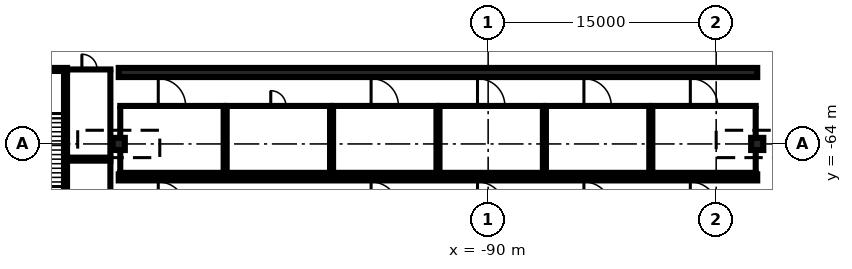
"""IFC4 building model, lengths in metres.
Left out: names, types, materials, properties, quantities, classifications, styles, units other than length and angle.
Written with IfcOpenShell. Run it as: python <this file> out.ifc"""

import sys

from ifc_helpers import new_model, si_unit, direction, frame, frame_2d, origin, origin_2d, place, context, subcontext, project, spatial, rectangle, extrude, element, fill, save


model = new_model("IFC4")
c1 = context("Model", 3, precision=1e-05, world=origin(), true_north=direction((0.0, 1.0)))
c2 = subcontext(c1, "Body", "Model", "MODEL_VIEW")
j1 = project(units=[si_unit("LENGTHUNIT", "METRE"), si_unit("PLANEANGLEUNIT", "RADIAN")], contexts=[c1])
p1 = place(None, origin())
s1 = spatial("IfcSite", under=j1, at=p1, CompositionType="ELEMENT")
p2 = place(p1, origin())
s2 = spatial("IfcBuilding", under=s1, at=p2, CompositionType="ELEMENT")
p3 = place(p2, frame((0.0, 0.0, -12.0)))
s3 = spatial("IfcBuildingStorey", under=s2, at=p3, CompositionType="ELEMENT", Elevation=-12.0)
for number, where, z_axis, x_axis in (
    (1, (-114.3, -64.0, 0.0), (0.0, 0.0, 1.0), (1.0, 0.0, 0.0)),
    (2, (-72.3, -64.0, 0.0), (0.0, 0.0, 1.0), (1.0, 0.0, 0.0)),
):
    element("IfcColumn", number, at=place(p3, frame(where, z_axis=z_axis, x_axis=x_axis)), inside=s3, PredefinedType="COLUMN", context=c2, shape_type="SweptSolid", body=[
        extrude(rectangle(XDim=0.8, YDim=0.8, at=origin_2d()), origin(), (0.0, 0.0, 1.0), 4.4),
    ])
p4 = place(p3, frame((-114.3, -65.9, 0.0), z_axis=(0.0, 0.0, 1.0), x_axis=(1.0, 0.0, 0.0)))
e3 = element("IfcWall", 3, at=p4, inside=s3, PredefinedType="PARTITIONING", context=c2, shape_type="SweptSolid", body=[
    extrude(rectangle(XDim=7.0, YDim=0.2, at=frame_2d((3.5, 0.0))), origin(), (0.0, 0.0, 1.0), 4.4),
])
p5 = place(p3, frame((-114.3, -61.5, 0.0), z_axis=(0.0, 0.0, 1.0), x_axis=(1.0, 0.0, 0.0)))
e4 = element("IfcWall", 4, at=p5, inside=s3, PredefinedType="PARTITIONING", context=c2, shape_type="SweptSolid", body=[
    extrude(rectangle(XDim=7.0, YDim=0.2, at=frame_2d((3.5, 0.0))), origin(), (0.0, 0.0, 1.0), 4.4),
])
p6 = place(p5, frame((2.6, 0.0, 0.0)))
e5 = element("IfcOpeningElement", 5, at=p6, cuts=e4, PredefinedType="OPENING", context=c2, shape_type="SweptSolid", body=[
    extrude(rectangle(XDim=1.8, YDim=2.1, at=frame_2d((0.9, 1.05))), frame((0.0, 0.11, 0.0), z_axis=(0.0, -1.0, 0.0), x_axis=(1.0, 0.0, 0.0)), (0.0, 0.0, 1.0), 0.22),
])
p7 = place(p3, frame((-114.2, -65.8, 0.0), z_axis=(0.0, 0.0, 1.0), x_axis=(0.0, 1.0, 0.0)))
e6 = element("IfcWall", 6, at=p7, inside=s3, PredefinedType="PARTITIONING", context=c2, shape_type="SweptSolid", body=[
    extrude(rectangle(XDim=1.4, YDim=0.2, at=frame_2d((0.7, 0.0))), origin(), (0.0, 0.0, 1.0), 4.4),
])
p8 = place(p3, frame((-114.2, -63.6, 0.0), z_axis=(0.0, 0.0, 1.0), x_axis=(0.0, 1.0, 0.0)))
e7 = element("IfcWall", 7, at=p8, inside=s3, PredefinedType="PARTITIONING", context=c2, shape_type="SweptSolid", body=[
    extrude(rectangle(XDim=2.0, YDim=0.2, at=frame_2d((1.0, 0.0))), origin(), (0.0, 0.0, 1.0), 4.4),
])
p9 = place(p3, frame((-107.4, -65.8, 0.0), z_axis=(0.0, 0.0, 1.0), x_axis=(0.0, 1.0, 0.0)))
e8 = element("IfcWall", 8, at=p9, inside=s3, PredefinedType="PARTITIONING", context=c2, shape_type="SweptSolid", body=[
    extrude(rectangle(XDim=4.2, YDim=0.2, at=frame_2d((2.1, 0.0))), origin(), (0.0, 0.0, 1.0), 4.4),
])
p10 = place(p3, frame((-107.3, -65.9, 0.0), z_axis=(0.0, 0.0, 1.0), x_axis=(1.0, 0.0, 0.0)))
e9 = element("IfcWall", 9, at=p10, inside=s3, PredefinedType="PARTITIONING", context=c2, shape_type="SweptSolid", body=[
    extrude(rectangle(XDim=7.0, YDim=0.2, at=frame_2d((3.5, 0.0))), origin(), (0.0, 0.0, 1.0), 4.4),
])
p11 = place(p3, frame((-107.3, -61.5, 0.0), z_axis=(0.0, 0.0, 1.0), x_axis=(1.0, 0.0, 0.0)))
e10 = element("IfcWall", 10, at=p11, inside=s3, PredefinedType="PARTITIONING", context=c2, shape_type="SweptSolid", body=[
    extrude(rectangle(XDim=7.0, YDim=0.2, at=frame_2d((3.5, 0.0))), origin(), (0.0, 0.0, 1.0), 4.4),
])
p12 = place(p11, frame((3.0, 0.0, 0.0)))
e11 = element("IfcOpeningElement", 11, at=p12, cuts=e10, PredefinedType="OPENING", context=c2, shape_type="SweptSolid", body=[
    extrude(rectangle(XDim=1.0, YDim=2.1, at=frame_2d((0.5, 1.05))), frame((0.0, 0.11, 0.0), z_axis=(0.0, -1.0, 0.0), x_axis=(1.0, 0.0, 0.0)), (0.0, 0.0, 1.0), 0.22),
])
for number, where, z_axis, x_axis in (
    (12, (-107.2, -65.8, 0.0), (0.0, 0.0, 1.0), (0.0, 1.0, 0.0)),
    (13, (-100.4, -65.8, 0.0), (0.0, 0.0, 1.0), (0.0, 1.0, 0.0)),
):
    element("IfcWall", number, at=place(p3, frame(where, z_axis=z_axis, x_axis=x_axis)), inside=s3, PredefinedType="PARTITIONING", context=c2, shape_type="SweptSolid", body=[
        extrude(rectangle(XDim=4.2, YDim=0.2, at=frame_2d((2.1, 0.0))), origin(), (0.0, 0.0, 1.0), 4.4),
    ])
p13 = place(p3, frame((-100.3, -65.9, 0.0), z_axis=(0.0, 0.0, 1.0), x_axis=(1.0, 0.0, 0.0)))
e14 = element("IfcWall", 14, at=p13, inside=s3, PredefinedType="PARTITIONING", context=c2, shape_type="SweptSolid", body=[
    extrude(rectangle(XDim=7.0, YDim=0.2, at=frame_2d((3.5, 0.0))), origin(), (0.0, 0.0, 1.0), 4.4),
])
p14 = place(p3, frame((-100.3, -61.5, 0.0), z_axis=(0.0, 0.0, 1.0), x_axis=(1.0, 0.0, 0.0)))
e15 = element("IfcWall", 15, at=p14, inside=s3, PredefinedType="PARTITIONING", context=c2, shape_type="SweptSolid", body=[
    extrude(rectangle(XDim=7.0, YDim=0.2, at=frame_2d((3.5, 0.0))), origin(), (0.0, 0.0, 1.0), 4.4),
])
p15 = place(p14, frame((2.6, 0.0, 0.0)))
e16 = element("IfcOpeningElement", 16, at=p15, cuts=e15, PredefinedType="OPENING", context=c2, shape_type="SweptSolid", body=[
    extrude(rectangle(XDim=1.8, YDim=2.1, at=frame_2d((0.9, 1.05))), frame((0.0, 0.11, 0.0), z_axis=(0.0, -1.0, 0.0), x_axis=(1.0, 0.0, 0.0)), (0.0, 0.0, 1.0), 0.22),
])
for number, where, z_axis, x_axis in (
    (17, (-100.2, -65.8, 0.0), (0.0, 0.0, 1.0), (0.0, 1.0, 0.0)),
    (18, (-93.4, -65.8, 0.0), (0.0, 0.0, 1.0), (0.0, 1.0, 0.0)),
):
    element("IfcWall", number, at=place(p3, frame(where, z_axis=z_axis, x_axis=x_axis)), inside=s3, PredefinedType="PARTITIONING", context=c2, shape_type="SweptSolid", body=[
        extrude(rectangle(XDim=4.2, YDim=0.2, at=frame_2d((2.1, 0.0))), origin(), (0.0, 0.0, 1.0), 4.4),
    ])
p16 = place(p3, frame((-93.3, -65.9, 0.0), z_axis=(0.0, 0.0, 1.0), x_axis=(1.0, 0.0, 0.0)))
e19 = element("IfcWall", 19, at=p16, inside=s3, PredefinedType="PARTITIONING", context=c2, shape_type="SweptSolid", body=[
    extrude(rectangle(XDim=7.0, YDim=0.2, at=frame_2d((3.5, 0.0))), origin(), (0.0, 0.0, 1.0), 4.4),
])
p17 = place(p3, frame((-93.3, -61.5, 0.0), z_axis=(0.0, 0.0, 1.0), x_axis=(1.0, 0.0, 0.0)))
e20 = element("IfcWall", 20, at=p17, inside=s3, PredefinedType="PARTITIONING", context=c2, shape_type="SweptSolid", body=[
    extrude(rectangle(XDim=7.0, YDim=0.2, at=frame_2d((3.5, 0.0))), origin(), (0.0, 0.0, 1.0), 4.4),
])
p18 = place(p17, frame((2.6, 0.0, 0.0)))
e21 = element("IfcOpeningElement", 21, at=p18, cuts=e20, PredefinedType="OPENING", context=c2, shape_type="SweptSolid", body=[
    extrude(rectangle(XDim=1.8, YDim=2.1, at=frame_2d((0.9, 1.05))), frame((0.0, 0.11, 0.0), z_axis=(0.0, -1.0, 0.0), x_axis=(1.0, 0.0, 0.0)), (0.0, 0.0, 1.0), 0.22),
])
for number, where, z_axis, x_axis in (
    (22, (-93.2, -65.8, 0.0), (0.0, 0.0, 1.0), (0.0, 1.0, 0.0)),
    (23, (-86.4, -65.8, 0.0), (0.0, 0.0, 1.0), (0.0, 1.0, 0.0)),
):
    element("IfcWall", number, at=place(p3, frame(where, z_axis=z_axis, x_axis=x_axis)), inside=s3, PredefinedType="PARTITIONING", context=c2, shape_type="SweptSolid", body=[
        extrude(rectangle(XDim=4.2, YDim=0.2, at=frame_2d((2.1, 0.0))), origin(), (0.0, 0.0, 1.0), 4.4),
    ])
p19 = place(p3, frame((-86.3, -65.9, 0.0), z_axis=(0.0, 0.0, 1.0), x_axis=(1.0, 0.0, 0.0)))
e24 = element("IfcWall", 24, at=p19, inside=s3, PredefinedType="PARTITIONING", context=c2, shape_type="SweptSolid", body=[
    extrude(rectangle(XDim=7.0, YDim=0.2, at=frame_2d((3.5, 0.0))), origin(), (0.0, 0.0, 1.0), 4.4),
])
p20 = place(p3, frame((-86.3, -61.5, 0.0), z_axis=(0.0, 0.0, 1.0), x_axis=(1.0, 0.0, 0.0)))
e25 = element("IfcWall", 25, at=p20, inside=s3, PredefinedType="PARTITIONING", context=c2, shape_type="SweptSolid", body=[
    extrude(rectangle(XDim=7.0, YDim=0.2, at=frame_2d((3.5, 0.0))), origin(), (0.0, 0.0, 1.0), 4.4),
])
p21 = place(p20, frame((2.6, 0.0, 0.0)))
e26 = element("IfcOpeningElement", 26, at=p21, cuts=e25, PredefinedType="OPENING", context=c2, shape_type="SweptSolid", body=[
    extrude(rectangle(XDim=1.8, YDim=2.1, at=frame_2d((0.9, 1.05))), frame((0.0, 0.11, 0.0), z_axis=(0.0, -1.0, 0.0), x_axis=(1.0, 0.0, 0.0)), (0.0, 0.0, 1.0), 0.22),
])
for number, where, z_axis, x_axis in (
    (27, (-86.2, -65.8, 0.0), (0.0, 0.0, 1.0), (0.0, 1.0, 0.0)),
    (28, (-79.4, -65.8, 0.0), (0.0, 0.0, 1.0), (0.0, 1.0, 0.0)),
):
    element("IfcWall", number, at=place(p3, frame(where, z_axis=z_axis, x_axis=x_axis)), inside=s3, PredefinedType="PARTITIONING", context=c2, shape_type="SweptSolid", body=[
        extrude(rectangle(XDim=4.2, YDim=0.2, at=frame_2d((2.1, 0.0))), origin(), (0.0, 0.0, 1.0), 4.4),
    ])
p22 = place(p3, frame((-79.3, -65.9, 0.0), z_axis=(0.0, 0.0, 1.0), x_axis=(1.0, 0.0, 0.0)))
e29 = element("IfcWall", 29, at=p22, inside=s3, PredefinedType="PARTITIONING", context=c2, shape_type="SweptSolid", body=[
    extrude(rectangle(XDim=7.0, YDim=0.2, at=frame_2d((3.5, 0.0))), origin(), (0.0, 0.0, 1.0), 4.4),
])
p23 = place(p3, frame((-79.3, -61.5, 0.0), z_axis=(0.0, 0.0, 1.0), x_axis=(1.0, 0.0, 0.0)))
e30 = element("IfcWall", 30, at=p23, inside=s3, PredefinedType="PARTITIONING", context=c2, shape_type="SweptSolid", body=[
    extrude(rectangle(XDim=7.0, YDim=0.2, at=frame_2d((3.5, 0.0))), origin(), (0.0, 0.0, 1.0), 4.4),
])
p24 = place(p23, frame((2.6, 0.0, 0.0)))
e31 = element("IfcOpeningElement", 31, at=p24, cuts=e30, PredefinedType="OPENING", context=c2, shape_type="SweptSolid", body=[
    extrude(rectangle(XDim=1.8, YDim=2.1, at=frame_2d((0.9, 1.05))), frame((0.0, 0.11, 0.0), z_axis=(0.0, -1.0, 0.0), x_axis=(1.0, 0.0, 0.0)), (0.0, 0.0, 1.0), 0.22),
])
p25 = place(p3, frame((-79.2, -65.8, 0.0), z_axis=(0.0, 0.0, 1.0), x_axis=(0.0, 1.0, 0.0)))
e32 = element("IfcWall", 32, at=p25, inside=s3, PredefinedType="PARTITIONING", context=c2, shape_type="SweptSolid", body=[
    extrude(rectangle(XDim=4.2, YDim=0.2, at=frame_2d((2.1, 0.0))), origin(), (0.0, 0.0, 1.0), 4.4),
])
p26 = place(p3, frame((-72.4, -65.8, 0.0), z_axis=(0.0, 0.0, 1.0), x_axis=(0.0, 1.0, 0.0)))
e33 = element("IfcWall", 33, at=p26, inside=s3, PredefinedType="PARTITIONING", context=c2, shape_type="SweptSolid", body=[
    extrude(rectangle(XDim=1.4, YDim=0.2, at=frame_2d((0.7, 0.0))), origin(), (0.0, 0.0, 1.0), 4.4),
])
p27 = place(p3, frame((-72.4, -63.6, 0.0), z_axis=(0.0, 0.0, 1.0), x_axis=(0.0, 1.0, 0.0)))
e34 = element("IfcWall", 34, at=p27, inside=s3, PredefinedType="PARTITIONING", context=c2, shape_type="SweptSolid", body=[
    extrude(rectangle(XDim=2.0, YDim=0.2, at=frame_2d((1.0, 0.0))), origin(), (0.0, 0.0, 1.0), 4.4),
])
p28 = place(p3, frame((-117.7, -65.1, 0.0), z_axis=(0.0, 0.0, 1.0), x_axis=(1.0, 0.0, 0.0)))
e35 = element("IfcWall", 35, at=p28, inside=s3, PredefinedType="PARTITIONING", context=c2, shape_type="SweptSolid", body=[
    extrude(rectangle(XDim=2.95, YDim=0.2, at=frame_2d((1.475, 0.0))), origin(), (0.0, 0.0, 1.0), 4.4),
])
p29 = place(p3, frame((-114.85, -68.8, 0.0), z_axis=(0.0, 0.0, 1.0), x_axis=(0.0, 1.0, 0.0)))
e36 = element("IfcWall", 36, at=p29, inside=s3, PredefinedType="PARTITIONING", context=c2, shape_type="SweptSolid", body=[
    extrude(rectangle(XDim=3.6, YDim=0.2, at=frame_2d((1.8, 0.0))), origin(), (0.0, 0.0, 1.0), 4.4),
])
p30 = place(p3, frame((-117.7, -64.9, 0.0), z_axis=(0.0, 0.0, 1.0), x_axis=(1.0, 0.0, 0.0)))
e37 = element("IfcWall", 37, at=p30, inside=s3, PredefinedType="PARTITIONING", context=c2, shape_type="SweptSolid", body=[
    extrude(rectangle(XDim=2.95, YDim=0.2, at=frame_2d((1.475, 0.0))), origin(), (0.0, 0.0, 1.0), 4.4),
])
p31 = place(p3, frame((-117.7, -59.1, 0.0), z_axis=(0.0, 0.0, 1.0), x_axis=(1.0, 0.0, 0.0)))
e38 = element("IfcWall", 38, at=p31, inside=s3, PredefinedType="PARTITIONING", context=c2, shape_type="SweptSolid", body=[
    extrude(rectangle(XDim=2.95, YDim=0.2, at=frame_2d((1.475, 0.0))), origin(), (0.0, 0.0, 1.0), 4.4),
])
p32 = place(p31, frame((0.975, 0.0, 0.0)))
e39 = element("IfcOpeningElement", 39, at=p32, cuts=e38, PredefinedType="OPENING", context=c2, shape_type="SweptSolid", body=[
    extrude(rectangle(XDim=1.0, YDim=2.1, at=frame_2d((0.5, 1.05))), frame((0.0, 0.11, 0.0), z_axis=(0.0, -1.0, 0.0), x_axis=(1.0, 0.0, 0.0)), (0.0, 0.0, 1.0), 0.22),
])
p33 = place(p3, frame((-114.85, -64.8, 0.0), z_axis=(0.0, 0.0, 1.0), x_axis=(0.0, 1.0, 0.0)))
e40 = element("IfcWall", 40, at=p33, inside=s3, PredefinedType="PARTITIONING", context=c2, shape_type="SweptSolid", body=[
    extrude(rectangle(XDim=5.6, YDim=0.2, at=frame_2d((2.8, 0.0))), origin(), (0.0, 0.0, 1.0), 4.4),
])
p34 = place(p3, frame((-117.8, -68.8, 0.0), z_axis=(0.0, 0.0, 1.0), x_axis=(0.0, 1.0, 0.0)))
e41 = element("IfcWall", 41, at=p34, inside=s3, PredefinedType="SOLIDWALL", context=c2, shape_type="SweptSolid", body=[
    extrude(rectangle(XDim=9.6, YDim=0.2, at=frame_2d((4.8, 0.0))), origin(), (0.0, 0.0, 1.0), 4.4),
])
p35 = place(p34, frame((0.4, 0.0, 0.0)))
e42 = element("IfcOpeningElement", 42, at=p35, cuts=e41, PredefinedType="OPENING", context=c2, shape_type="SweptSolid", body=[
    extrude(rectangle(XDim=1.2, YDim=2.1, at=frame_2d((0.6, 1.05))), frame((0.0, 0.11, 0.0), z_axis=(0.0, -1.0, 0.0), x_axis=(1.0, 0.0, 0.0)), (0.0, 0.0, 1.0), 0.22),
])
p36 = place(p3, frame((-122.7, -59.1, 0.0), z_axis=(0.0, 0.0, 1.0), x_axis=(1.0, 0.0, 0.0)))
e43 = element("IfcWall", 43, at=p36, inside=s3, PredefinedType="SOLIDWALL", context=c2, shape_type="SweptSolid", body=[
    extrude(rectangle(XDim=5.0, YDim=0.2, at=frame_2d((2.5, 0.0))), origin(), (0.0, 0.0, 1.0), 4.4),
])
p37 = place(p3, frame((-114.3, -66.2, 0.0), z_axis=(0.0, 0.0, 1.0), x_axis=(1.0, 0.0, 0.0)))
e44 = element("IfcWall", 44, at=p37, inside=s3, PredefinedType="SOLIDWALL", context=c2, shape_type="SweptSolid", body=[
    extrude(rectangle(XDim=42.0, YDim=0.4, at=frame_2d((21.0, 0.0))), origin(), (0.0, 0.0, 1.0), 4.4),
])
p38 = place(p3, frame((-114.3, -59.3, 0.0), z_axis=(0.0, 0.0, 1.0), x_axis=(1.0, 0.0, 0.0)))
e45 = element("IfcWall", 45, at=p38, inside=s3, PredefinedType="SOLIDWALL", context=c2, shape_type="SweptSolid", body=[
    extrude(rectangle(XDim=42.0, YDim=0.6, at=frame_2d((21.0, 0.0))), origin(), (0.0, 0.0, 1.0), 4.4),
])
p39 = place(p6, origin())
e46 = element("IfcDoor", 46, at=p39, inside=s3, OperationType="DOUBLE_DOOR_SINGLE_SWING", PredefinedType="DOOR", context=c2, shape_type="SweptSolid", body=[
    extrude(rectangle(XDim=1.8, YDim=2.1, at=frame_2d((0.9, 1.05))), frame((0.0, 0.025, 0.0), z_axis=(0.0, -1.0, 0.0), x_axis=(1.0, 0.0, 0.0)), (0.0, 0.0, 1.0), 0.05),
])
fill(e5, e46)
p40 = place(p12, origin())
e47 = element("IfcDoor", 47, at=p40, inside=s3, OperationType="SINGLE_SWING_LEFT", PredefinedType="DOOR", context=c2, shape_type="SweptSolid", body=[
    extrude(rectangle(XDim=1.0, YDim=2.1, at=frame_2d((0.5, 1.05))), frame((0.0, 0.025, 0.0), z_axis=(0.0, -1.0, 0.0), x_axis=(1.0, 0.0, 0.0)), (0.0, 0.0, 1.0), 0.05),
])
fill(e11, e47)
p41 = place(p15, origin())
e48 = element("IfcDoor", 48, at=p41, inside=s3, OperationType="DOUBLE_DOOR_SINGLE_SWING", PredefinedType="DOOR", context=c2, shape_type="SweptSolid", body=[
    extrude(rectangle(XDim=1.8, YDim=2.1, at=frame_2d((0.9, 1.05))), frame((0.0, 0.025, 0.0), z_axis=(0.0, -1.0, 0.0), x_axis=(1.0, 0.0, 0.0)), (0.0, 0.0, 1.0), 0.05),
])
fill(e16, e48)
p42 = place(p18, origin())
e49 = element("IfcDoor", 49, at=p42, inside=s3, OperationType="DOUBLE_DOOR_SINGLE_SWING", PredefinedType="DOOR", context=c2, shape_type="SweptSolid", body=[
    extrude(rectangle(XDim=1.8, YDim=2.1, at=frame_2d((0.9, 1.05))), frame((0.0, 0.025, 0.0), z_axis=(0.0, -1.0, 0.0), x_axis=(1.0, 0.0, 0.0)), (0.0, 0.0, 1.0), 0.05),
])
fill(e21, e49)
p43 = place(p21, origin())
e50 = element("IfcDoor", 50, at=p43, inside=s3, OperationType="DOUBLE_DOOR_SINGLE_SWING", PredefinedType="DOOR", context=c2, shape_type="SweptSolid", body=[
    extrude(rectangle(XDim=1.8, YDim=2.1, at=frame_2d((0.9, 1.05))), frame((0.0, 0.025, 0.0), z_axis=(0.0, -1.0, 0.0), x_axis=(1.0, 0.0, 0.0)), (0.0, 0.0, 1.0), 0.05),
])
fill(e26, e50)
p44 = place(p24, origin())
e51 = element("IfcDoor", 51, at=p44, inside=s3, OperationType="DOUBLE_DOOR_SINGLE_SWING", PredefinedType="DOOR", context=c2, shape_type="SweptSolid", body=[
    extrude(rectangle(XDim=1.8, YDim=2.1, at=frame_2d((0.9, 1.05))), frame((0.0, 0.025, 0.0), z_axis=(0.0, -1.0, 0.0), x_axis=(1.0, 0.0, 0.0)), (0.0, 0.0, 1.0), 0.05),
])
fill(e31, e51)
p45 = place(p32, origin())
e52 = element("IfcDoor", 52, at=p45, inside=s3, OperationType="SINGLE_SWING_LEFT", PredefinedType="DOOR", context=c2, shape_type="SweptSolid", body=[
    extrude(rectangle(XDim=1.0, YDim=2.1, at=frame_2d((0.5, 1.05))), frame((0.0, 0.025, 0.0), z_axis=(0.0, -1.0, 0.0), x_axis=(1.0, 0.0, 0.0)), (0.0, 0.0, 1.0), 0.05),
])
fill(e39, e52)
save(model, sys.argv[1])
